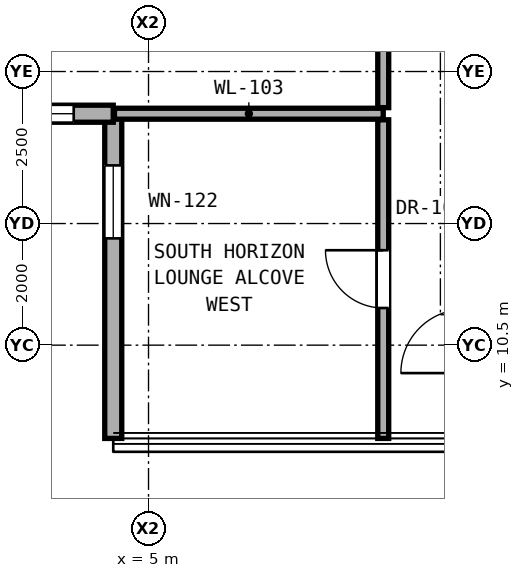
"""IFC4 building model, lengths in metres.
Left out: names, types, materials, properties, quantities, classifications, styles, units other than length and angle.
Written with IfcOpenShell. Run it as: python <this file> out.ifc"""

import sys

from ifc_helpers import new_model, si_unit, direction, frame, frame_2d, origin, place, context, subcontext, project, spatial, rectangle, extrude, element, fill, save


model = new_model("IFC4")
c1 = context("Model", 3, precision=1e-05, world=origin(), true_north=direction((0.0, 1.0)))
c2 = subcontext(c1, "Body", "Model", "MODEL_VIEW")
j1 = project(units=[si_unit("LENGTHUNIT", "METRE"), si_unit("PLANEANGLEUNIT", "RADIAN")], contexts=[c1])
p1 = place(None, origin())
s1 = spatial("IfcSite", under=j1, at=p1, CompositionType="ELEMENT")
p2 = place(p1, origin())
s2 = spatial("IfcBuilding", under=s1, at=p2, CompositionType="ELEMENT")
p3 = place(p2, frame((0.0, 0.0, 62.0)))
s3 = spatial("IfcBuildingStorey", under=s2, at=p3, CompositionType="ELEMENT", Elevation=62.0)
p4 = place(p3, frame((4.42, 14.306, 0.0), z_axis=(0.0, 0.0, 1.0), x_axis=(0.0, -1.0, 0.0)))
e1 = element("IfcWall", 1, at=p4, inside=s3, PredefinedType="SOLIDWALL", context=c2, shape_type="SweptSolid", body=[
    extrude(rectangle(XDim=5.34, YDim=0.28, at=frame_2d((2.67, 0.0))), origin(), (0.0, 0.0, 1.0), 3.04),
])
p5 = place(p4, frame((0.85, 0.0, 0.79)))
e2 = element("IfcOpeningElement", 2, at=p5, cuts=e1, PredefinedType="OPENING", context=c2, shape_type="SweptSolid", body=[
    extrude(rectangle(XDim=1.2, YDim=2.1, at=frame_2d((0.6, 1.05))), frame((0.0, 0.15, 0.0), z_axis=(0.0, -1.0, 0.0), x_axis=(1.0, 0.0, 0.0)), (0.0, 0.0, 1.0), 0.3),
])
p6 = place(p3, frame((-0.92, 14.306, 0.0), z_axis=(0.0, 0.0, 1.0), x_axis=(1.0, 0.0, 0.0)))
e3 = element("IfcWall", 3, at=p6, inside=s3, PredefinedType="SOLIDWALL", context=c2, shape_type="SweptSolid", body=[
    extrude(rectangle(XDim=5.34, YDim=0.28, at=frame_2d((2.67, 0.0))), origin(), (0.0, 0.0, 1.0), 3.04),
])
p7 = place(p6, frame((3.59, 0.0, 0.85)))
e4 = element("IfcOpeningElement", 4, at=p7, cuts=e3, PredefinedType="OPENING", context=c2, shape_type="SweptSolid", body=[
    extrude(rectangle(XDim=1.1, YDim=2.0, at=frame_2d((0.55, 1.0))), frame((0.0, 0.15, 0.0), z_axis=(0.0, -1.0, 0.0), x_axis=(1.0, 0.0, 0.0)), (0.0, 0.0, 1.0), 0.3),
])
p8 = place(p3, frame((4.44, 14.306, 0.0), z_axis=(0.0, 0.0, 1.0), x_axis=(1.0, 0.0, 0.0)))
e5 = element("IfcWall", 5, at=p8, inside=s3, PredefinedType="PARTITIONING", context=c2, shape_type="SweptSolid", body=[
    extrude(rectangle(XDim=4.42, YDim=0.18, at=frame_2d((2.21, 0.0))), origin(), (0.0, 0.0, 1.0), 3.06),
])
p9 = place(p3, frame((8.86, 8.966, 0.0), z_axis=(0.0, 0.0, 1.0), x_axis=(0.0, 1.0, 0.0)))
e6 = element("IfcWall", 6, at=p9, inside=s3, PredefinedType="PARTITIONING", context=c2, shape_type="SweptSolid", body=[
    extrude(rectangle(XDim=5.24, YDim=0.18, at=frame_2d((2.62, 0.0))), origin(), (0.0, 0.0, 1.0), 3.06),
])
p10 = place(p9, frame((2.145, 0.0, 0.0)))
e7 = element("IfcOpeningElement", 7, at=p10, cuts=e6, PredefinedType="OPENING", context=c2, shape_type="SweptSolid", body=[
    extrude(rectangle(XDim=0.95, YDim=2.15, at=frame_2d((0.475, 1.075))), frame((0.0, 0.1, 0.0), z_axis=(0.0, -1.0, 0.0), x_axis=(1.0, 0.0, 0.0)), (0.0, 0.0, 1.0), 0.2),
])
p11 = place(p3, frame((8.86, 14.406, 0.0), z_axis=(0.0, 0.0, 1.0), x_axis=(0.0, 1.0, 0.0)))
e8 = element("IfcWall", 8, at=p11, inside=s3, PredefinedType="PARTITIONING", context=c2, shape_type="SweptSolid", body=[
    extrude(rectangle(XDim=9.629, YDim=0.18, at=frame_2d((4.814, 0.0))), origin(), (0.0, 0.0, 1.0), 2.436),
])
p12 = place(p11, frame((4.29, 0.0, 0.0)))
e9 = element("IfcOpeningElement", 9, at=p12, cuts=e8, PredefinedType="OPENING", context=c2, shape_type="SweptSolid", body=[
    extrude(rectangle(XDim=1.05, YDim=2.2, at=frame_2d((0.525, 1.1))), frame((0.0, 0.1, 0.0), z_axis=(0.0, -1.0, 0.0), x_axis=(1.0, 0.0, 0.0)), (0.0, 0.0, 1.0), 0.2),
])
p13 = place(p5, origin())
e10 = element("IfcWindow", 10, at=p13, inside=s3, PartitioningType="SINGLE_PANEL", PredefinedType="WINDOW", context=c2, shape_type="SweptSolid", body=[
    extrude(rectangle(XDim=1.2, YDim=2.1, at=frame_2d((0.6, 1.05))), frame((0.0, 0.03, 0.0), z_axis=(0.0, -1.0, 0.0), x_axis=(1.0, 0.0, 0.0)), (0.0, 0.0, 1.0), 0.06),
])
fill(e2, e10)
p14 = place(p7, origin())
e11 = element("IfcWindow", 11, at=p14, inside=s3, PartitioningType="SINGLE_PANEL", PredefinedType="WINDOW", context=c2, shape_type="SweptSolid", body=[
    extrude(rectangle(XDim=1.1, YDim=2.0, at=frame_2d((0.55, 1.0))), frame((0.0, 0.03, 0.0), z_axis=(0.0, -1.0, 0.0), x_axis=(1.0, 0.0, 0.0)), (0.0, 0.0, 1.0), 0.06),
])
fill(e4, e11)
p15 = place(p10, origin())
e12 = element("IfcDoor", 12, at=p15, inside=s3, OperationType="SINGLE_SWING_RIGHT", PredefinedType="DOOR", context=c2, shape_type="SweptSolid", body=[
    extrude(rectangle(XDim=0.95, YDim=2.15, at=frame_2d((0.475, 1.075))), frame((0.0, 0.025, 0.0), z_axis=(0.0, -1.0, 0.0), x_axis=(1.0, 0.0, 0.0)), (0.0, 0.0, 1.0), 0.05),
])
fill(e7, e12)
save(model, sys.argv[1])
